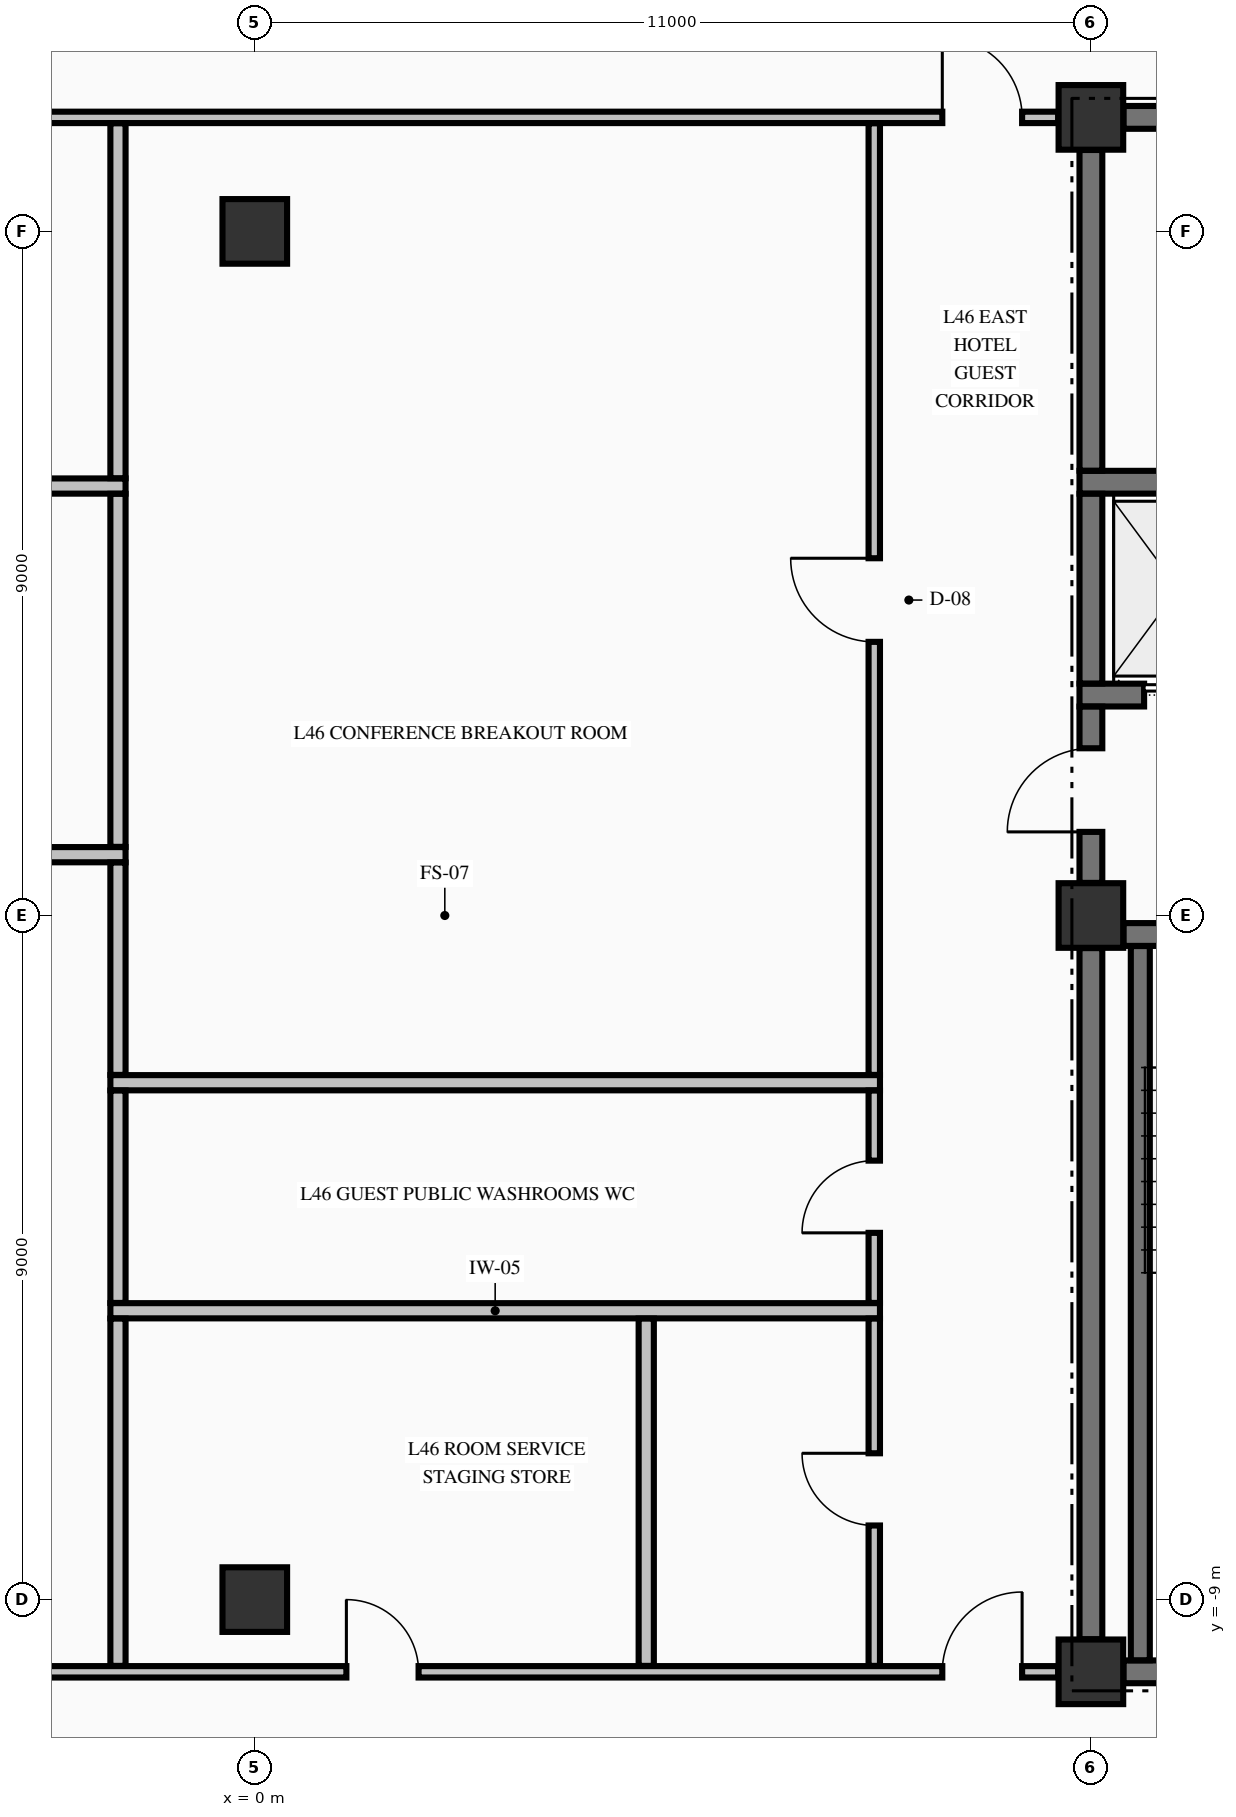
"""IFC4 building model, lengths in metres.
Left out: names, types, materials, properties, quantities, classifications, styles, units other than length and angle.
Written with IfcOpenShell. Run it as: python <this file> out.ifc"""

import sys

from ifc_helpers import new_model, si_unit, direction, frame, frame_2d, origin, origin_2d, place, context, subcontext, project, spatial, rectangle, extrude, element, fill, save


model = new_model("IFC4")
c1 = context("Model", 3, precision=1e-05, world=origin(), true_north=direction((0.0, 1.0)))
c2 = subcontext(c1, "Body", "Model", "MODEL_VIEW")
j1 = project(units=[si_unit("LENGTHUNIT", "METRE"), si_unit("PLANEANGLEUNIT", "RADIAN")], contexts=[c1])
p1 = place(None, origin())
s1 = spatial("IfcSite", under=j1, at=p1, CompositionType="ELEMENT")
p2 = place(p1, origin())
s2 = spatial("IfcBuilding", under=s1, at=p2, CompositionType="ELEMENT")
p3 = place(p2, frame((0.0, 0.0, 179.66)))
s3 = spatial("IfcBuildingStorey", under=s2, at=p3, CompositionType="ELEMENT", Elevation=179.66)
for number, where, z_axis, x_axis in (
    (1, (11.0, -9.95, -0.25), (0.0, 0.0, 1.0), (1.0, 0.0, 0.0)),
    (2, (11.0, 0.0, -0.25), (0.0, 0.0, 1.0), (1.0, 0.0, 0.0)),
    (3, (11.0, 10.5, -0.25), (0.0, 0.0, 1.0), (1.0, 0.0, 0.0)),
    (4, (0.0, -9.0, -0.25), (0.0, 0.0, 1.0), (1.0, 0.0, 0.0)),
    (5, (0.0, 9.0, -0.25), (0.0, 0.0, 1.0), (1.0, 0.0, 0.0)),
):
    element("IfcColumn", number, at=place(p3, frame(where, z_axis=z_axis, x_axis=x_axis)), inside=s3, PredefinedType="COLUMN", context=c2, shape_type="SweptSolid", body=[
        extrude(rectangle(XDim=0.85, YDim=0.85, at=origin_2d()), origin(), (0.0, 0.0, 1.0), 3.4),
    ])
p4 = place(p3, frame((11.429, -9.95, 0.0), z_axis=(0.0, 0.0, 1.0), x_axis=(1.0, 0.0, 0.0)))
e6 = element("IfcWall", 6, at=p4, inside=s3, PredefinedType="SHEAR", context=c2, shape_type="SweptSolid", body=[
    extrude(rectangle(XDim=3.271, YDim=0.3, at=frame_2d((1.635, 0.0))), origin(), (0.0, 0.0, 1.0), 3.15),
])
p5 = place(p3, frame((11.429, -0.25, 0.0), z_axis=(0.0, 0.0, 1.0), x_axis=(1.0, 0.0, 0.0)))
e7 = element("IfcWall", 7, at=p5, inside=s3, PredefinedType="SHEAR", context=c2, shape_type="SweptSolid", body=[
    extrude(rectangle(XDim=3.446, YDim=0.3, at=frame_2d((1.723, 0.0))), origin(), (0.0, 0.0, 1.0), 3.15),
])
p6 = place(p5, frame((1.171, 0.0, 0.0)))
e8 = element("IfcOpeningElement", 8, at=p6, cuts=e7, PredefinedType="OPENING", context=c2, shape_type="SweptSolid", body=[
    extrude(rectangle(XDim=1.1, YDim=2.15, at=frame_2d((0.55, 1.075))), frame((0.0, 0.16, 0.0), z_axis=(0.0, -1.0, 0.0), x_axis=(1.0, 0.0, 0.0)), (0.0, 0.0, 1.0), 0.32),
])
p7 = place(p3, frame((10.85, 2.9, 0.0), z_axis=(0.0, 0.0, 1.0), x_axis=(1.0, 0.0, 0.0)))
e9 = element("IfcWall", 9, at=p7, inside=s3, PredefinedType="SHEAR", context=c2, shape_type="SweptSolid", body=[
    extrude(rectangle(XDim=4.025, YDim=0.3, at=frame_2d((2.012, 0.0))), origin(), (0.0, 0.0, 1.0), 3.15),
])
p8 = place(p7, frame((0.85, 0.0, 0.0)))
e10 = element("IfcOpeningElement", 10, at=p8, cuts=e9, PredefinedType="OPENING", context=c2, shape_type="SweptSolid", body=[
    extrude(rectangle(XDim=1.1, YDim=2.2, at=frame_2d((0.55, 1.1))), frame((0.0, 0.16, 0.0), z_axis=(0.0, -1.0, 0.0), x_axis=(1.0, 0.0, 0.0)), (0.0, 0.0, 1.0), 0.32),
])
p9 = place(p3, frame((10.85, 5.7, 0.0), z_axis=(0.0, 0.0, 1.0), x_axis=(1.0, 0.0, 0.0)))
e11 = element("IfcWall", 11, at=p9, inside=s3, PredefinedType="SHEAR", context=c2, shape_type="SweptSolid", body=[
    extrude(rectangle(XDim=4.025, YDim=0.3, at=frame_2d((2.012, 0.0))), origin(), (0.0, 0.0, 1.0), 3.15),
])
p10 = place(p3, frame((11.429, 10.5, 0.0), z_axis=(0.0, 0.0, 1.0), x_axis=(1.0, 0.0, 0.0)))
e12 = element("IfcWall", 12, at=p10, inside=s3, PredefinedType="SHEAR", context=c2, shape_type="SweptSolid", body=[
    extrude(rectangle(XDim=3.271, YDim=0.3, at=frame_2d((1.635, 0.0))), origin(), (0.0, 0.0, 1.0), 3.15),
])
p11 = place(p10, frame((1.546, 0.0, 0.0)))
e13 = element("IfcOpeningElement", 13, at=p11, cuts=e12, PredefinedType="OPENING", context=c2, shape_type="SweptSolid", body=[
    extrude(rectangle(XDim=0.95, YDim=2.15, at=frame_2d((0.475, 1.075))), frame((0.0, 0.16, 0.0), z_axis=(0.0, -1.0, 0.0), x_axis=(1.0, 0.0, 0.0)), (0.0, 0.0, 1.0), 0.32),
])
p12 = place(p3, frame((-10.569, -9.95, 0.0), z_axis=(0.0, 0.0, 1.0), x_axis=(1.0, 0.0, 0.0)))
e14 = element("IfcWall", 14, at=p12, inside=s3, PredefinedType="PARTITIONING", context=c2, shape_type="SweptSolid", body=[
    extrude(rectangle(XDim=21.138, YDim=0.15, at=frame_2d((10.569, 0.0))), origin(), (0.0, 0.0, 1.0), 3.15),
])
p13 = place(p12, frame((0.474, 0.0, 0.0)))
e15 = element("IfcOpeningElement", 15, at=p13, cuts=e14, PredefinedType="OPENING", context=c2, shape_type="SweptSolid", body=[
    extrude(rectangle(XDim=1.05, YDim=2.15, at=frame_2d((0.525, 1.075))), frame((0.0, 0.085, 0.0), z_axis=(0.0, -1.0, 0.0), x_axis=(1.0, 0.0, 0.0)), (0.0, 0.0, 1.0), 0.17),
])
p14 = place(p12, frame((19.614, 0.0, 0.0)))
e16 = element("IfcOpeningElement", 16, at=p14, cuts=e14, PredefinedType="OPENING", context=c2, shape_type="SweptSolid", body=[
    extrude(rectangle(XDim=1.05, YDim=2.15, at=frame_2d((0.525, 1.075))), frame((0.0, 0.085, 0.0), z_axis=(0.0, -1.0, 0.0), x_axis=(1.0, 0.0, 0.0)), (0.0, 0.0, 1.0), 0.17),
])
p15 = place(p12, frame((11.774, 0.0, 0.0)))
e17 = element("IfcOpeningElement", 17, at=p15, cuts=e14, PredefinedType="OPENING", context=c2, shape_type="SweptSolid", body=[
    extrude(rectangle(XDim=0.95, YDim=2.15, at=frame_2d((0.475, 1.075))), frame((0.0, 0.085, 0.0), z_axis=(0.0, -1.0, 0.0), x_axis=(1.0, 0.0, 0.0)), (0.0, 0.0, 1.0), 0.17),
])
for number, where, z_axis, x_axis in (
    (18, (-1.9, -5.2, 0.0), (0.0, 0.0, 1.0), (1.0, 0.0, 0.0)),
    (19, (-1.9, -2.2, 0.0), (0.0, 0.0, 1.0), (1.0, 0.0, 0.0)),
):
    element("IfcWall", number, at=place(p3, frame(where, z_axis=z_axis, x_axis=x_axis)), inside=s3, PredefinedType="PARTITIONING", context=c2, shape_type="SweptSolid", body=[
        extrude(rectangle(XDim=10.125, YDim=0.2, at=frame_2d((5.062, 0.0))), origin(), (0.0, 0.0, 1.0), 3.15),
    ])
for number, where, z_axis, x_axis in (
    (20, (-8.225, 0.8, 0.0), (0.0, 0.0, 1.0), (1.0, 0.0, 0.0)),
    (21, (-8.225, 5.65, 0.0), (0.0, 0.0, 1.0), (1.0, 0.0, 0.0)),
):
    element("IfcWall", number, at=place(p3, frame(where, z_axis=z_axis, x_axis=x_axis)), inside=s3, PredefinedType="PARTITIONING", context=c2, shape_type="SweptSolid", body=[
        extrude(rectangle(XDim=6.525, YDim=0.2, at=frame_2d((3.263, 0.0))), origin(), (0.0, 0.0, 1.0), 3.15),
    ])
p16 = place(p3, frame((-10.569, 10.5, 0.0), z_axis=(0.0, 0.0, 1.0), x_axis=(1.0, 0.0, 0.0)))
e22 = element("IfcWall", 22, at=p16, inside=s3, PredefinedType="PARTITIONING", context=c2, shape_type="SweptSolid", body=[
    extrude(rectangle(XDim=21.138, YDim=0.15, at=frame_2d((10.569, 0.0))), origin(), (0.0, 0.0, 1.0), 3.15),
])
p17 = place(p16, frame((0.474, 0.0, 0.0)))
e23 = element("IfcOpeningElement", 23, at=p17, cuts=e22, PredefinedType="OPENING", context=c2, shape_type="SweptSolid", body=[
    extrude(rectangle(XDim=1.05, YDim=2.15, at=frame_2d((0.525, 1.075))), frame((0.0, 0.085, 0.0), z_axis=(0.0, -1.0, 0.0), x_axis=(1.0, 0.0, 0.0)), (0.0, 0.0, 1.0), 0.17),
])
p18 = place(p16, frame((19.614, 0.0, 0.0)))
e24 = element("IfcOpeningElement", 24, at=p18, cuts=e22, PredefinedType="OPENING", context=c2, shape_type="SweptSolid", body=[
    extrude(rectangle(XDim=1.05, YDim=2.15, at=frame_2d((0.525, 1.075))), frame((0.0, 0.085, 0.0), z_axis=(0.0, -1.0, 0.0), x_axis=(1.0, 0.0, 0.0)), (0.0, 0.0, 1.0), 0.17),
])
p19 = place(p3, frame((11.0, -9.521, 0.0), z_axis=(0.0, 0.0, 1.0), x_axis=(0.0, 1.0, 0.0)))
e25 = element("IfcWall", 25, at=p19, inside=s3, PredefinedType="SHEAR", context=c2, shape_type="SweptSolid", body=[
    extrude(rectangle(XDim=9.092, YDim=0.3, at=frame_2d((4.546, 0.0))), origin(), (0.0, 0.0, 1.0), 3.15),
])
p20 = place(p3, frame((11.0, 0.429, 0.0), z_axis=(0.0, 0.0, 1.0), x_axis=(0.0, 1.0, 0.0)))
e26 = element("IfcWall", 26, at=p20, inside=s3, PredefinedType="SHEAR", context=c2, shape_type="SweptSolid", body=[
    extrude(rectangle(XDim=2.319, YDim=0.3, at=frame_2d((1.16, 0.0))), origin(), (0.0, 0.0, 1.0), 3.15),
])
p21 = place(p20, frame((0.671, 0.0, 0.0)))
e27 = element("IfcOpeningElement", 27, at=p21, cuts=e26, PredefinedType="OPENING", context=c2, shape_type="SweptSolid", body=[
    extrude(rectangle(XDim=1.1, YDim=2.15, at=frame_2d((0.55, 1.075))), frame((0.0, 0.16, 0.0), z_axis=(0.0, -1.0, 0.0), x_axis=(1.0, 0.0, 0.0)), (0.0, 0.0, 1.0), 0.32),
])
p22 = place(p3, frame((11.0, 3.052, 0.0), z_axis=(0.0, 0.0, 1.0), x_axis=(0.0, 1.0, 0.0)))
e28 = element("IfcWall", 28, at=p22, inside=s3, PredefinedType="SHEAR", context=c2, shape_type="SweptSolid", body=[
    extrude(rectangle(XDim=2.496, YDim=0.3, at=frame_2d((1.248, 0.0))), origin(), (0.0, 0.0, 1.0), 3.15),
])
p23 = place(p3, frame((11.0, 5.852, 0.0), z_axis=(0.0, 0.0, 1.0), x_axis=(0.0, 1.0, 0.0)))
e29 = element("IfcWall", 29, at=p23, inside=s3, PredefinedType="SHEAR", context=c2, shape_type="SweptSolid", body=[
    extrude(rectangle(XDim=4.219, YDim=0.3, at=frame_2d((2.109, 0.0))), origin(), (0.0, 0.0, 1.0), 3.15),
])
p24 = place(p3, frame((11.65, -9.798, 0.0), z_axis=(0.0, 0.0, 1.0), x_axis=(0.0, 1.0, 0.0)))
e30 = element("IfcWall", 30, at=p24, inside=s3, PredefinedType="SOLIDWALL", context=c2, shape_type="SweptSolid", body=[
    extrude(rectangle(XDim=9.396, YDim=0.25, at=frame_2d((4.698, 0.0))), origin(), (0.0, 0.0, 1.0), 3.15),
])
p25 = place(p3, frame((-1.8, -9.872, 0.0), z_axis=(0.0, 0.0, 1.0), x_axis=(0.0, 1.0, 0.0)))
e31 = element("IfcWall", 31, at=p25, inside=s3, PredefinedType="PARTITIONING", context=c2, shape_type="SweptSolid", body=[
    extrude(rectangle(XDim=4.569, YDim=0.2, at=frame_2d((2.285, 0.0))), origin(), (0.0, 0.0, 1.0), 3.15),
])
for number, where, z_axis, x_axis in (
    (32, (-1.8, -5.097, 0.0), (0.0, 0.0, 1.0), (0.0, 1.0, 0.0)),
    (33, (-1.8, -2.097, 0.0), (0.0, 0.0, 1.0), (0.0, 1.0, 0.0)),
):
    element("IfcWall", number, at=place(p3, frame(where, z_axis=z_axis, x_axis=x_axis)), inside=s3, PredefinedType="PARTITIONING", context=c2, shape_type="SweptSolid", body=[
        extrude(rectangle(XDim=2.794, YDim=0.2, at=frame_2d((1.397, 0.0))), origin(), (0.0, 0.0, 1.0), 3.15),
    ])
p26 = place(p3, frame((-1.8, 0.903, 0.0), z_axis=(0.0, 0.0, 1.0), x_axis=(0.0, 1.0, 0.0)))
e34 = element("IfcWall", 34, at=p26, inside=s3, PredefinedType="PARTITIONING", context=c2, shape_type="SweptSolid", body=[
    extrude(rectangle(XDim=4.644, YDim=0.2, at=frame_2d((2.322, 0.0))), origin(), (0.0, 0.0, 1.0), 3.15),
])
p27 = place(p3, frame((-1.8, 5.753, 0.0), z_axis=(0.0, 0.0, 1.0), x_axis=(0.0, 1.0, 0.0)))
e35 = element("IfcWall", 35, at=p27, inside=s3, PredefinedType="PARTITIONING", context=c2, shape_type="SweptSolid", body=[
    extrude(rectangle(XDim=4.669, YDim=0.2, at=frame_2d((2.334, 0.0))), origin(), (0.0, 0.0, 1.0), 3.15),
])
p28 = place(p3, frame((5.15, -9.872, 0.0), z_axis=(0.0, 0.0, 1.0), x_axis=(0.0, 1.0, 0.0)))
e36 = element("IfcWall", 36, at=p28, inside=s3, PredefinedType="PARTITIONING", context=c2, shape_type="SweptSolid", body=[
    extrude(rectangle(XDim=4.569, YDim=0.2, at=frame_2d((2.285, 0.0))), origin(), (0.0, 0.0, 1.0), 3.15),
])
p29 = place(p3, frame((8.15, -9.872, 0.0), z_axis=(0.0, 0.0, 1.0), x_axis=(0.0, 1.0, 0.0)))
e37 = element("IfcWall", 37, at=p29, inside=s3, PredefinedType="PARTITIONING", context=c2, shape_type="SweptSolid", body=[
    extrude(rectangle(XDim=4.569, YDim=0.15, at=frame_2d((2.285, 0.0))), origin(), (0.0, 0.0, 1.0), 3.15),
])
p30 = place(p29, frame((1.847, 0.0, 0.0)))
e38 = element("IfcOpeningElement", 38, at=p30, cuts=e37, PredefinedType="OPENING", context=c2, shape_type="SweptSolid", body=[
    extrude(rectangle(XDim=0.95, YDim=2.15, at=frame_2d((0.475, 1.075))), frame((0.0, 0.085, 0.0), z_axis=(0.0, -1.0, 0.0), x_axis=(1.0, 0.0, 0.0)), (0.0, 0.0, 1.0), 0.17),
])
p31 = place(p3, frame((8.15, -5.097, 0.0), z_axis=(0.0, 0.0, 1.0), x_axis=(0.0, 1.0, 0.0)))
e39 = element("IfcWall", 39, at=p31, inside=s3, PredefinedType="PARTITIONING", context=c2, shape_type="SweptSolid", body=[
    extrude(rectangle(XDim=2.794, YDim=0.15, at=frame_2d((1.397, 0.0))), origin(), (0.0, 0.0, 1.0), 3.15),
])
p32 = place(p31, frame((0.922, 0.0, 0.0)))
e40 = element("IfcOpeningElement", 40, at=p32, cuts=e39, PredefinedType="OPENING", context=c2, shape_type="SweptSolid", body=[
    extrude(rectangle(XDim=0.95, YDim=2.15, at=frame_2d((0.475, 1.075))), frame((0.0, 0.085, 0.0), z_axis=(0.0, -1.0, 0.0), x_axis=(1.0, 0.0, 0.0)), (0.0, 0.0, 1.0), 0.17),
])
p33 = place(p3, frame((8.15, -2.097, 0.0), z_axis=(0.0, 0.0, 1.0), x_axis=(0.0, 1.0, 0.0)))
e41 = element("IfcWall", 41, at=p33, inside=s3, PredefinedType="PARTITIONING", context=c2, shape_type="SweptSolid", body=[
    extrude(rectangle(XDim=12.519, YDim=0.15, at=frame_2d((6.26, 0.0))), origin(), (0.0, 0.0, 1.0), 3.15),
])
p34 = place(p33, frame((5.697, 0.0, 0.0)))
e42 = element("IfcOpeningElement", 42, at=p34, cuts=e41, PredefinedType="OPENING", context=c2, shape_type="SweptSolid", body=[
    extrude(rectangle(XDim=1.1, YDim=2.15, at=frame_2d((0.55, 1.075))), frame((0.0, 0.085, 0.0), z_axis=(0.0, -1.0, 0.0), x_axis=(1.0, 0.0, 0.0)), (0.0, 0.0, 1.0), 0.17),
])
p35 = place(p21, origin())
e43 = element("IfcDoor", 43, at=p35, inside=s3, OperationType="SINGLE_SWING_LEFT", PredefinedType="DOOR", context=c2, shape_type="SweptSolid", body=[
    extrude(rectangle(XDim=1.1, YDim=2.15, at=frame_2d((0.55, 1.075))), frame((0.0, 0.025, 0.0), z_axis=(0.0, -1.0, 0.0), x_axis=(1.0, 0.0, 0.0)), (0.0, 0.0, 1.0), 0.05),
])
fill(e27, e43)
p36 = place(p8, origin())
e44 = element("IfcDoor", 44, at=p36, inside=s3, OperationType="SLIDING_TO_RIGHT", PredefinedType="DOOR", context=c2, shape_type="SweptSolid", body=[
    extrude(rectangle(XDim=1.1, YDim=2.2, at=frame_2d((0.55, 1.1))), frame((0.0, 0.025, 0.0), z_axis=(0.0, -1.0, 0.0), x_axis=(1.0, 0.0, 0.0)), (0.0, 0.0, 1.0), 0.05),
])
fill(e10, e44)
p37 = place(p18, origin())
e45 = element("IfcDoor", 45, at=p37, inside=s3, OperationType="SINGLE_SWING_LEFT", PredefinedType="DOOR", context=c2, shape_type="SweptSolid", body=[
    extrude(rectangle(XDim=1.05, YDim=2.15, at=frame_2d((0.525, 1.075))), frame((0.0, 0.025, 0.0), z_axis=(0.0, -1.0, 0.0), x_axis=(1.0, 0.0, 0.0)), (0.0, 0.0, 1.0), 0.05),
])
fill(e24, e45)
p38 = place(p14, origin())
e46 = element("IfcDoor", 46, at=p38, inside=s3, OperationType="SINGLE_SWING_RIGHT", PredefinedType="DOOR", context=c2, shape_type="SweptSolid", body=[
    extrude(rectangle(XDim=1.05, YDim=2.15, at=frame_2d((0.525, 1.075))), frame((0.0, 0.025, 0.0), z_axis=(0.0, -1.0, 0.0), x_axis=(1.0, 0.0, 0.0)), (0.0, 0.0, 1.0), 0.05),
])
fill(e16, e46)
p39 = place(p34, origin())
e47 = element("IfcDoor", 47, at=p39, inside=s3, OperationType="SINGLE_SWING_RIGHT", PredefinedType="DOOR", context=c2, shape_type="SweptSolid", body=[
    extrude(rectangle(XDim=1.1, YDim=2.15, at=frame_2d((0.55, 1.075))), frame((0.0, 0.025, 0.0), z_axis=(0.0, -1.0, 0.0), x_axis=(1.0, 0.0, 0.0)), (0.0, 0.0, 1.0), 0.05),
])
fill(e42, e47)
p40 = place(p32, origin())
e48 = element("IfcDoor", 48, at=p40, inside=s3, OperationType="SINGLE_SWING_LEFT", PredefinedType="DOOR", context=c2, shape_type="SweptSolid", body=[
    extrude(rectangle(XDim=0.95, YDim=2.15, at=frame_2d((0.475, 1.075))), frame((0.0, 0.025, 0.0), z_axis=(0.0, -1.0, 0.0), x_axis=(1.0, 0.0, 0.0)), (0.0, 0.0, 1.0), 0.05),
])
fill(e40, e48)
p41 = place(p30, origin())
e49 = element("IfcDoor", 49, at=p41, inside=s3, OperationType="SINGLE_SWING_RIGHT", PredefinedType="DOOR", context=c2, shape_type="SweptSolid", body=[
    extrude(rectangle(XDim=0.95, YDim=2.15, at=frame_2d((0.475, 1.075))), frame((0.0, 0.025, 0.0), z_axis=(0.0, -1.0, 0.0), x_axis=(1.0, 0.0, 0.0)), (0.0, 0.0, 1.0), 0.05),
])
fill(e38, e49)
p42 = place(p15, origin())
e50 = element("IfcDoor", 50, at=p42, inside=s3, OperationType="SINGLE_SWING_LEFT", PredefinedType="DOOR", context=c2, shape_type="SweptSolid", body=[
    extrude(rectangle(XDim=0.95, YDim=2.15, at=frame_2d((0.475, 1.075))), frame((0.0, 0.025, 0.0), z_axis=(0.0, -1.0, 0.0), x_axis=(1.0, 0.0, 0.0)), (0.0, 0.0, 1.0), 0.05),
])
fill(e17, e50)
save(model, sys.argv[1])
